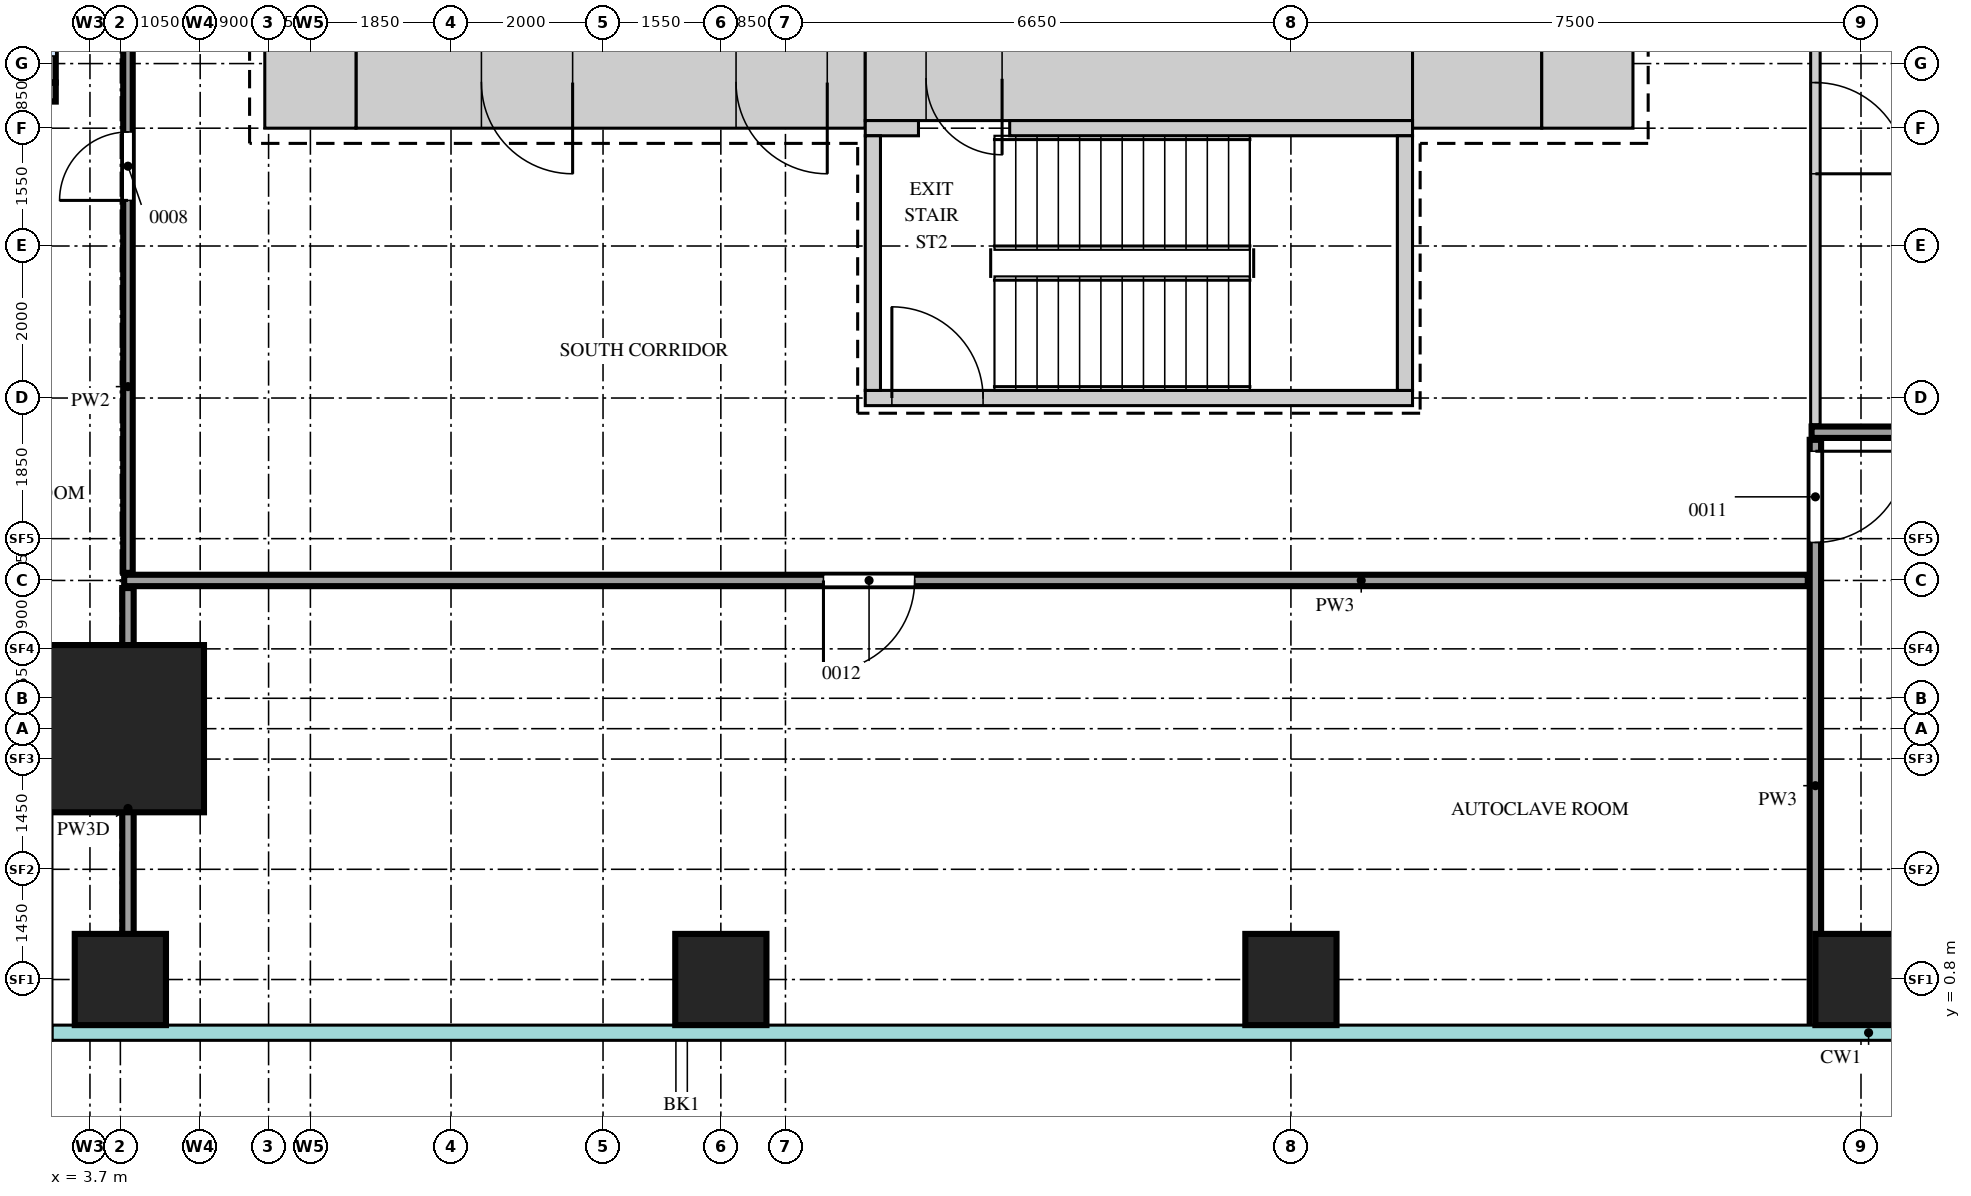
"""IFC4 building model, lengths in metres.
Left out: names, types, materials, properties, quantities, classifications, styles, units other than length and angle.
Written with IfcOpenShell. Run it as: python <this file> out.ifc"""

import sys

from ifc_helpers import new_model, si_unit, direction, frame, frame_2d, origin, origin_2d, place, context, subcontext, project, spatial, rectangle, extrude, source, transform, mapped, element, fill, save


model = new_model("IFC4")
c1 = context("Model", 3, precision=1e-05, world=origin(), true_north=direction((0.0, 1.0)))
c2 = subcontext(c1, "Body", "Model", "MODEL_VIEW")
j1 = project(units=[si_unit("LENGTHUNIT", "METRE"), si_unit("PLANEANGLEUNIT", "RADIAN")], contexts=[c1])
p1 = place(None, origin())
s1 = spatial("IfcSite", under=j1, at=p1, CompositionType="ELEMENT")
p2 = place(p1, origin())
s2 = spatial("IfcBuilding", under=s1, at=p2, CompositionType="ELEMENT")
p3 = place(p2, frame((0.0, 0.0, 51.0)))
s3 = spatial("IfcBuildingStorey", under=s2, at=p3, CompositionType="ELEMENT", Elevation=51.0)
m1 = source(origin(), c2, "Body", "SweptSolid", [
    extrude(rectangle(XDim=6.7, YDim=1.2, at=frame_2d((3.35, 0.0))), origin(), (0.0, 0.0, 1.0), 4.2),
])
p4 = place(p3, frame((7.2, 12.6, 0.0), z_axis=(0.0, 0.0, 1.0), x_axis=(1.0, 0.0, 0.0)))
e1 = element("IfcWall", 1, at=p4, inside=s3, PredefinedType="SHEAR", context=c2, shape_type="MappedRepresentation", body=[
    mapped(m1, transform((0.0, 0.0, 0.0))),
])
m2 = source(origin(), c2, "Body", "SweptSolid", [
    extrude(rectangle(XDim=1.2, YDim=2.1, at=frame_2d((0.6, 1.05))), frame((0.0, 0.61, 0.0), z_axis=(0.0, -1.0, 0.0), x_axis=(1.0, 0.0, 0.0)), (0.0, 0.0, 1.0), 1.22),
])
p5 = place(p4, frame((5.0, 0.0, 0.0)))
e2 = element("IfcOpeningElement", 2, at=p5, cuts=e1, PredefinedType="OPENING", context=c2, shape_type="MappedRepresentation", body=[
    mapped(m2, transform((0.0, 0.0, 0.0))),
])
p6 = place(p4, frame((1.65, 0.0, 0.0)))
e3 = element("IfcOpeningElement", 3, at=p6, cuts=e1, PredefinedType="OPENING", context=c2, shape_type="MappedRepresentation", body=[
    mapped(m2, transform((0.0, 0.0, 0.0))),
])
m3 = source(origin(), c2, "Body", "SweptSolid", [
    extrude(rectangle(XDim=7.2, YDim=1.1, at=frame_2d((3.6, 0.0))), origin(), (0.0, 0.0, 1.0), 4.2),
])
p7 = place(p3, frame((13.9, 12.65, 0.0), z_axis=(0.0, 0.0, 1.0), x_axis=(1.0, 0.0, 0.0)))
e4 = element("IfcWall", 4, at=p7, inside=s3, PredefinedType="SHEAR", context=c2, shape_type="MappedRepresentation", body=[
    mapped(m3, transform((0.0, 0.0, 0.0))),
])
m4 = source(origin(), c2, "Body", "SweptSolid", [
    extrude(rectangle(XDim=1.0, YDim=2.1, at=frame_2d((0.5, 1.05))), frame((0.0, 0.56, 0.0), z_axis=(0.0, -1.0, 0.0), x_axis=(1.0, 0.0, 0.0)), (0.0, 0.0, 1.0), 1.12),
])
p8 = place(p7, frame((0.8, 0.0, 0.0)))
e5 = element("IfcOpeningElement", 5, at=p8, cuts=e4, PredefinedType="OPENING", context=c2, shape_type="MappedRepresentation", body=[
    mapped(m4, transform((0.0, 0.0, 0.0))),
])
m5 = source(origin(), c2, "Body", "SweptSolid", [
    extrude(rectangle(XDim=1.7, YDim=1.2, at=frame_2d((0.85, 0.0))), origin(), (0.0, 0.0, 1.0), 4.2),
])
p9 = place(p3, frame((21.1, 12.6, 0.0), z_axis=(0.0, 0.0, 1.0), x_axis=(1.0, 0.0, 0.0)))
e6 = element("IfcWall", 6, at=p9, inside=s3, PredefinedType="SHEAR", context=c2, shape_type="MappedRepresentation", body=[
    mapped(m5, transform((0.0, 0.0, 0.0))),
])
m6 = source(origin(), c2, "Body", "SweptSolid", [
    extrude(rectangle(XDim=1.2, YDim=1.2, at=frame_2d((0.6, 0.0))), origin(), (0.0, 0.0, 1.0), 4.2),
])
for number, where, z_axis, x_axis in (
    (7, (22.8, 12.6, 0.0), (0.0, 0.0, 1.0), (1.0, 0.0, 0.0)),
    (8, (6.0, 12.6, 0.0), (0.0, 0.0, 1.0), (1.0, 0.0, 0.0)),
):
    element("IfcWall", number, at=place(p3, frame(where, z_axis=z_axis, x_axis=x_axis)), inside=s3, PredefinedType="SHEAR", context=c2, shape_type="MappedRepresentation", body=[
        mapped(m6, transform((0.0, 0.0, 0.0))),
    ])
m7 = source(origin(), c2, "Body", "SweptSolid", [
    extrude(rectangle(XDim=0.7, YDim=0.2, at=frame_2d((0.35, 0.0))), origin(), (0.0, 0.0, 1.0), 4.2),
])
p10 = place(p3, frame((13.9, 12.0, 0.0), z_axis=(0.0, 0.0, 1.0), x_axis=(1.0, 0.0, 0.0)))
e9 = element("IfcWall", 9, at=p10, inside=s3, PredefinedType="SHEAR", context=c2, shape_type="MappedRepresentation", body=[
    mapped(m7, transform((0.0, 0.0, 0.0))),
])
m8 = source(origin(), c2, "Body", "SweptSolid", [
    extrude(rectangle(XDim=5.3, YDim=0.2, at=frame_2d((2.65, 0.0))), origin(), (0.0, 0.0, 1.0), 4.2),
])
p11 = place(p3, frame((15.8, 12.0, 0.0), z_axis=(0.0, 0.0, 1.0), x_axis=(1.0, 0.0, 0.0)))
e10 = element("IfcWall", 10, at=p11, inside=s3, PredefinedType="SHEAR", context=c2, shape_type="MappedRepresentation", body=[
    mapped(m8, transform((0.0, 0.0, 0.0))),
])
m9 = source(origin(), c2, "Body", "SweptSolid", [
    extrude(rectangle(XDim=7.2, YDim=0.2, at=frame_2d((3.6, 0.0))), origin(), (0.0, 0.0, 1.0), 4.2),
])
p12 = place(p3, frame((13.9, 8.45, 0.0), z_axis=(0.0, 0.0, 1.0), x_axis=(1.0, 0.0, 0.0)))
e11 = element("IfcWall", 11, at=p12, inside=s3, PredefinedType="SHEAR", context=c2, shape_type="MappedRepresentation", body=[
    mapped(m9, transform((0.0, 0.0, 0.0))),
])
m10 = source(origin(), c2, "Body", "SweptSolid", [
    extrude(rectangle(XDim=1.2, YDim=2.1, at=frame_2d((0.6, 1.05))), frame((0.0, 0.11, 0.0), z_axis=(0.0, -1.0, 0.0), x_axis=(1.0, 0.0, 0.0)), (0.0, 0.0, 1.0), 0.22),
])
p13 = place(p12, frame((0.35, 0.0, 0.0)))
e12 = element("IfcOpeningElement", 12, at=p13, cuts=e11, PredefinedType="OPENING", context=c2, shape_type="MappedRepresentation", body=[
    mapped(m10, transform((0.0, 0.0, 0.0))),
])
m11 = source(origin(), c2, "Body", "SweptSolid", [
    extrude(rectangle(XDim=3.35, YDim=0.2, at=frame_2d((1.675, 0.0))), origin(), (0.0, 0.0, 1.0), 4.2),
])
for number, where, z_axis, x_axis in (
    (13, (21.0, 8.55, 0.0), (0.0, 0.0, 1.0), (0.0, 1.0, 0.0)),
    (14, (14.0, 8.55, 0.0), (0.0, 0.0, 1.0), (0.0, 1.0, 0.0)),
):
    element("IfcWall", number, at=place(p3, frame(where, z_axis=z_axis, x_axis=x_axis)), inside=s3, PredefinedType="SHEAR", context=c2, shape_type="MappedRepresentation", body=[
        mapped(m11, transform((0.0, 0.0, 0.0))),
    ])
m12 = source(origin(), c2, "Body", "SweptSolid", [
    extrude(rectangle(XDim=2.2, YDim=2.2, at=origin_2d()), origin(), (0.0, 0.0, 1.0), 4.5),
])
p14 = place(p3, frame((4.1, 4.1, 0.0), z_axis=(0.0, 0.0, 1.0), x_axis=(1.0, 0.0, 0.0)))
e15 = element("IfcColumn", 15, at=p14, inside=s3, PredefinedType="COLUMN", context=c2, shape_type="MappedRepresentation", body=[
    mapped(m12, transform((0.0, 0.0, 0.0))),
])
m13 = source(origin(), c2, "Body", "SweptSolid", [
    extrude(rectangle(XDim=1.2, YDim=1.2, at=origin_2d()), origin(), (0.0, 0.0, 1.0), 4.2),
])
for number, where, z_axis, x_axis in (
    (16, (4.1, 0.8, 0.0), (0.0, 0.0, 1.0), (1.0, 0.0, 0.0)),
    (17, (12.0, 0.8, 0.0), (0.0, 0.0, 1.0), (1.0, 0.0, 0.0)),
    (18, (19.5, 0.8, 0.0), (0.0, 0.0, 1.0), (1.0, 0.0, 0.0)),
    (19, (27.0, 0.8, 0.0), (0.0, 0.0, 1.0), (1.0, 0.0, 0.0)),
):
    element("IfcColumn", number, at=place(p3, frame(where, z_axis=z_axis, x_axis=x_axis)), inside=s3, PredefinedType="COLUMN", context=c2, shape_type="MappedRepresentation", body=[
        mapped(m13, transform((0.0, 0.0, 0.0))),
    ])
m14 = source(origin(), c2, "Body", "SweptSolid", [
    extrude(rectangle(XDim=6.3, YDim=0.25, at=frame_2d((3.15, 0.0))), origin(), (0.0, 0.0, 1.0), 4.2),
])
p15 = place(p3, frame((3.125, 12.6, 0.0), z_axis=(0.0, 0.0, 1.0), x_axis=(0.0, 1.0, 0.0)))
e20 = element("IfcWall", 20, at=p15, inside=s3, PredefinedType="SOLIDWALL", context=c2, shape_type="MappedRepresentation", body=[
    mapped(m14, transform((0.0, 0.0, 0.0))),
])
m15 = source(origin(), c2, "Body", "SweptSolid", [
    extrude(rectangle(XDim=1.6, YDim=2.4, at=frame_2d((0.8, 1.2))), frame((0.0, 0.135, 0.0), z_axis=(0.0, -1.0, 0.0), x_axis=(1.0, 0.0, 0.0)), (0.0, 0.0, 1.0), 0.27),
])
p16 = place(p15, frame((0.35, 0.0, 0.0)))
e21 = element("IfcOpeningElement", 21, at=p16, cuts=e20, PredefinedType="OPENING", context=c2, shape_type="MappedRepresentation", body=[
    mapped(m15, transform((0.0, 0.0, 0.0))),
])
p17 = place(p15, frame((4.35, 0.0, 0.0)))
e22 = element("IfcOpeningElement", 22, at=p17, cuts=e20, PredefinedType="OPENING", context=c2, shape_type="MappedRepresentation", body=[
    mapped(m15, transform((0.0, 0.0, 0.0))),
])
m16 = source(origin(), c2, "Body", "SweptSolid", [
    extrude(rectangle(XDim=1.8, YDim=2.4, at=frame_2d((0.9, 1.2))), frame((0.0, 0.135, 0.0), z_axis=(0.0, -1.0, 0.0), x_axis=(1.0, 0.0, 0.0)), (0.0, 0.0, 1.0), 0.27),
])
p18 = place(p15, frame((2.25, 0.0, 0.0)))
e23 = element("IfcOpeningElement", 23, at=p18, cuts=e20, PredefinedType="OPENING", context=c2, shape_type="MappedRepresentation", body=[
    mapped(m16, transform((0.0, 0.0, 0.0))),
])
m17 = source(origin(), c2, "Body", "SweptSolid", [
    extrude(rectangle(XDim=1.85, YDim=0.25, at=frame_2d((0.925, 0.0))), origin(), (0.0, 0.0, 1.0), 3.9),
])
p19 = place(p3, frame((1.4, 12.475, 0.0), z_axis=(0.0, 0.0, 1.0), x_axis=(1.0, 0.0, 0.0)))
e24 = element("IfcWall", 24, at=p19, inside=s3, PredefinedType="SOLIDWALL", context=c2, shape_type="MappedRepresentation", body=[
    mapped(m17, transform((0.0, 0.0, 0.0))),
])
m18 = source(origin(), c2, "Body", "SweptSolid", [
    extrude(rectangle(XDim=5.8, YDim=0.15, at=frame_2d((2.9, 0.0))), origin(), (0.0, 0.0, 1.0), 3.6),
])
p20 = place(p3, frame((4.2, 0.15, 0.0), z_axis=(0.0, 0.0, 1.0), x_axis=(0.0, 1.0, 0.0)))
e25 = element("IfcWall", 25, at=p20, inside=s3, PredefinedType="PARTITIONING", context=c2, shape_type="MappedRepresentation", body=[
    mapped(m18, transform((0.0, 0.0, 0.0))),
])
m19 = source(origin(), c2, "Body", "SweptSolid", [
    extrude(rectangle(XDim=7.75, YDim=0.15, at=frame_2d((3.875, 0.0))), origin(), (0.0, 0.0, 1.0), 4.3),
])
p21 = place(p3, frame((26.4, 0.15, 0.0), z_axis=(0.0, 0.0, 1.0), x_axis=(0.0, 1.0, 0.0)))
e26 = element("IfcWall", 26, at=p21, inside=s3, PredefinedType="PARTITIONING", context=c2, shape_type="MappedRepresentation", body=[
    mapped(m19, transform((0.0, 0.0, 0.0))),
])
m20 = source(origin(), c2, "Body", "SweptSolid", [
    extrude(rectangle(XDim=1.2, YDim=2.1, at=frame_2d((0.6, 1.05))), frame((0.0, 0.085, 0.0), z_axis=(0.0, -1.0, 0.0), x_axis=(1.0, 0.0, 0.0)), (0.0, 0.0, 1.0), 0.17),
])
p22 = place(p21, frame((6.4, 0.0, 0.0)))
e27 = element("IfcOpeningElement", 27, at=p22, cuts=e26, PredefinedType="OPENING", context=c2, shape_type="MappedRepresentation", body=[
    mapped(m20, transform((0.0, 0.0, 0.0))),
])
m21 = source(origin(), c2, "Body", "SweptSolid", [
    extrude(rectangle(XDim=22.15, YDim=0.15, at=frame_2d((11.075, 0.0))), origin(), (0.0, 0.0, 1.0), 4.3),
])
p23 = place(p3, frame((4.15, 6.05, 0.0), z_axis=(0.0, 0.0, 1.0), x_axis=(1.0, 0.0, 0.0)))
e28 = element("IfcWall", 28, at=p23, inside=s3, PredefinedType="PARTITIONING", context=c2, shape_type="MappedRepresentation", body=[
    mapped(m21, transform((0.0, 0.0, 0.0))),
])
p24 = place(p23, frame((9.2, 0.0, 0.0)))
e29 = element("IfcOpeningElement", 29, at=p24, cuts=e28, PredefinedType="OPENING", context=c2, shape_type="MappedRepresentation", body=[
    mapped(m20, transform((0.0, 0.0, 0.0))),
])
m22 = source(origin(), c2, "Body", "SweptSolid", [
    extrude(rectangle(XDim=27.5, YDim=0.15, at=frame_2d((13.75, 0.0))), origin(), (0.0, 0.0, 1.0), 4.3),
])
p25 = place(p3, frame((26.35, 8.0, 0.0), z_axis=(0.0, 0.0, 1.0), x_axis=(1.0, 0.0, 0.0)))
e30 = element("IfcWall", 30, at=p25, inside=s3, PredefinedType="PARTITIONING", context=c2, shape_type="MappedRepresentation", body=[
    mapped(m22, transform((0.0, 0.0, 0.0))),
])
m23 = source(origin(), c2, "Body", "SweptSolid", [
    extrude(rectangle(XDim=27.1, YDim=0.125, at=frame_2d((13.55, 0.0))), origin(), (0.0, 0.0, 1.0), 4.3),
])
p26 = place(p3, frame((26.4, 8.1, 0.0), z_axis=(0.0, 0.0, 1.0), x_axis=(0.0, 1.0, 0.0)))
e31 = element("IfcWall", 31, at=p26, inside=s3, PredefinedType="PARTITIONING", context=c2, shape_type="MappedRepresentation", body=[
    mapped(m23, transform((0.0, 0.0, 0.0))),
])
m24 = source(origin(), c2, "Body", "SweptSolid", [
    extrude(rectangle(XDim=1.2, YDim=2.1, at=frame_2d((0.6, 1.05))), frame((0.0, 0.073, 0.0), z_axis=(0.0, -1.0, 0.0), x_axis=(1.0, 0.0, 0.0)), (0.0, 0.0, 1.0), 0.145),
])
p27 = place(p26, frame((3.3, 0.0, 0.0)))
e32 = element("IfcOpeningElement", 32, at=p27, cuts=e31, PredefinedType="OPENING", context=c2, shape_type="MappedRepresentation", body=[
    mapped(m24, transform((0.0, 0.0, 0.0))),
])
p28 = place(p26, frame((11.3, 0.0, 0.0)))
e33 = element("IfcOpeningElement", 33, at=p28, cuts=e31, PredefinedType="OPENING", context=c2, shape_type="MappedRepresentation", body=[
    mapped(m24, transform((0.0, 0.0, 0.0))),
])
m25 = source(origin(), c2, "Body", "SweptSolid", [
    extrude(rectangle(XDim=8.6, YDim=0.125, at=frame_2d((4.3, 0.0))), origin(), (0.0, 0.0, 1.0), 4.3),
])
p29 = place(p3, frame((4.2, 6.15, 0.0), z_axis=(0.0, 0.0, 1.0), x_axis=(0.0, 1.0, 0.0)))
e34 = element("IfcWall", 34, at=p29, inside=s3, PredefinedType="PARTITIONING", context=c2, shape_type="MappedRepresentation", body=[
    mapped(m25, transform((0.0, 0.0, 0.0))),
])
m26 = source(origin(), c2, "Body", "SweptSolid", [
    extrude(rectangle(XDim=0.9, YDim=2.1, at=frame_2d((0.45, 1.05))), frame((0.0, 0.073, 0.0), z_axis=(0.0, -1.0, 0.0), x_axis=(1.0, 0.0, 0.0)), (0.0, 0.0, 1.0), 0.145),
])
p30 = place(p29, frame((4.9, 0.0, 0.0)))
e35 = element("IfcOpeningElement", 35, at=p30, cuts=e34, PredefinedType="OPENING", context=c2, shape_type="MappedRepresentation", body=[
    mapped(m26, transform((0.0, 0.0, 0.0))),
])
m27 = source(origin(), c2, "Body", "SweptSolid", [
    extrude(rectangle(XDim=1.2, YDim=2.1, at=frame_2d((0.6, 1.05))), frame((0.0, 0.55, 0.0), z_axis=(0.0, -1.0, 0.0), x_axis=(1.0, 0.0, 0.0)), (0.0, 0.0, 1.0), 1.1),
])
p31 = place(p5, origin())
e36 = element("IfcDoor", 36, at=p31, inside=s3, OperationType="SINGLE_SWING_RIGHT", PredefinedType="DOOR", context=c2, shape_type="MappedRepresentation", body=[
    mapped(m27, transform((0.0, 0.0, 0.0))),
])
fill(e2, e36)
p32 = place(p6, origin())
e37 = element("IfcDoor", 37, at=p32, inside=s3, OperationType="SINGLE_SWING_RIGHT", PredefinedType="DOOR", context=c2, shape_type="MappedRepresentation", body=[
    mapped(m27, transform((0.0, 0.0, 0.0))),
])
fill(e3, e37)
m28 = source(origin(), c2, "Body", "SweptSolid", [
    extrude(rectangle(XDim=1.0, YDim=2.1, at=frame_2d((0.5, 1.05))), frame((0.0, 0.5, 0.0), z_axis=(0.0, -1.0, 0.0), x_axis=(1.0, 0.0, 0.0)), (0.0, 0.0, 1.0), 1.0),
])
p33 = place(p8, origin())
e38 = element("IfcDoor", 38, at=p33, inside=s3, OperationType="SINGLE_SWING_RIGHT", PredefinedType="DOOR", context=c2, shape_type="MappedRepresentation", body=[
    mapped(m28, transform((0.0, 0.0, 0.0))),
])
fill(e5, e38)
m29 = source(origin(), c2, "Body", "SweptSolid", [
    extrude(rectangle(XDim=1.2, YDim=2.1, at=frame_2d((0.6, 1.05))), frame((0.0, 0.025, 0.0), z_axis=(0.0, -1.0, 0.0), x_axis=(1.0, 0.0, 0.0)), (0.0, 0.0, 1.0), 0.05),
])
p34 = place(p22, origin())
e39 = element("IfcDoor", 39, at=p34, inside=s3, OperationType="SINGLE_SWING_RIGHT", PredefinedType="DOOR", context=c2, shape_type="MappedRepresentation", body=[
    mapped(m29, transform((0.0, 0.0, 0.0))),
])
fill(e27, e39)
p35 = place(p27, origin())
e40 = element("IfcDoor", 40, at=p35, inside=s3, OperationType="SINGLE_SWING_LEFT", PredefinedType="DOOR", context=c2, shape_type="MappedRepresentation", body=[
    mapped(m29, transform((0.0, 0.0, 0.0))),
])
fill(e32, e40)
m30 = source(origin(), c2, "Body", "SweptSolid", [
    extrude(rectangle(XDim=0.9, YDim=2.1, at=frame_2d((0.45, 1.05))), frame((0.0, 0.025, 0.0), z_axis=(0.0, -1.0, 0.0), x_axis=(1.0, 0.0, 0.0)), (0.0, 0.0, 1.0), 0.05),
])
p36 = place(p30, origin())
e41 = element("IfcDoor", 41, at=p36, inside=s3, OperationType="SINGLE_SWING_RIGHT", PredefinedType="DOOR", context=c2, shape_type="MappedRepresentation", body=[
    mapped(m30, transform((0.0, 0.0, 0.0))),
])
fill(e35, e41)
p37 = place(p24, origin())
e42 = element("IfcDoor", 42, at=p37, inside=s3, OperationType="SINGLE_SWING_LEFT", PredefinedType="DOOR", context=c2, shape_type="MappedRepresentation", body=[
    mapped(m29, transform((0.0, 0.0, 0.0))),
])
fill(e29, e42)
p38 = place(p13, origin())
e43 = element("IfcDoor", 43, at=p38, inside=s3, OperationType="SINGLE_SWING_RIGHT", PredefinedType="DOOR", context=c2, shape_type="MappedRepresentation", body=[
    mapped(m29, transform((0.0, 0.0, 0.0))),
])
fill(e12, e43)
save(model, sys.argv[1])
